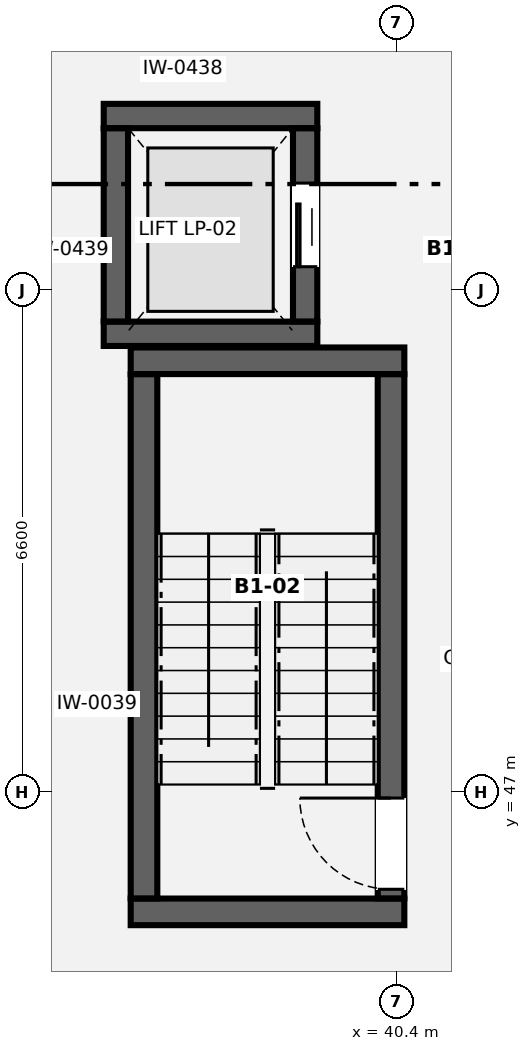
"""IFC4 building model, lengths in metres.
Left out: names, types, materials, properties, quantities, classifications, styles, units other than length and angle.
Written with IfcOpenShell. Run it as: python <this file> out.ifc"""

import sys

from ifc_helpers import new_model, si_unit, direction, frame, frame_2d, origin, place, context, subcontext, project, spatial, rectangle, extrude, element, fill, save


model = new_model("IFC4")
c1 = context("Model", 3, precision=1e-05, world=origin(), true_north=direction((0.0, 1.0)))
c2 = subcontext(c1, "Body", "Model", "MODEL_VIEW")
j1 = project(units=[si_unit("LENGTHUNIT", "METRE"), si_unit("PLANEANGLEUNIT", "RADIAN")], contexts=[c1])
p1 = place(None, origin())
s1 = spatial("IfcSite", under=j1, at=p1, CompositionType="ELEMENT")
p2 = place(p1, origin())
s2 = spatial("IfcBuilding", under=s1, at=p2, CompositionType="ELEMENT")
p3 = place(p2, frame((0.0, 0.0, -4.2)))
s3 = spatial("IfcBuildingStorey", under=s2, at=p3, CompositionType="ELEMENT", Elevation=-4.2)
for number, where, z_axis, x_axis in (
    (1, (36.9, 45.425, 0.0), (0.0, 0.0, 1.0), (1.0, 0.0, 0.0)),
    (2, (36.9, 52.675, 0.0), (0.0, 0.0, 1.0), (1.0, 0.0, 0.0)),
):
    element("IfcWall", number, at=place(p3, frame(where, z_axis=z_axis, x_axis=x_axis)), inside=s3, PredefinedType="SHEAR", context=c2, shape_type="SweptSolid", body=[
        extrude(rectangle(XDim=3.6, YDim=0.35, at=frame_2d((1.8, 0.0))), origin(), (0.0, 0.0, 1.0), 3.94),
    ])
p4 = place(p3, frame((37.075, 45.602, 0.0), z_axis=(0.0, 0.0, 1.0), x_axis=(0.0, 1.0, 0.0)))
e3 = element("IfcWall", 3, at=p4, inside=s3, PredefinedType="SHEAR", context=c2, shape_type="SweptSolid", body=[
    extrude(rectangle(XDim=6.896, YDim=0.35, at=frame_2d((3.448, 0.0))), origin(), (0.0, 0.0, 1.0), 3.94),
])
p5 = place(p3, frame((40.325, 45.602, 0.0), z_axis=(0.0, 0.0, 1.0), x_axis=(0.0, 1.0, 0.0)))
e4 = element("IfcWall", 4, at=p5, inside=s3, PredefinedType="SHEAR", context=c2, shape_type="SweptSolid", body=[
    extrude(rectangle(XDim=6.896, YDim=0.35, at=frame_2d((3.448, 0.0))), origin(), (0.0, 0.0, 1.0), 3.94),
])
p6 = place(p5, frame((0.12, 0.0, 0.0)))
e5 = element("IfcOpeningElement", 5, at=p6, cuts=e4, PredefinedType="OPENING", context=c2, shape_type="SweptSolid", body=[
    extrude(rectangle(XDim=1.2, YDim=2.15, at=frame_2d((0.6, 1.075))), frame((0.0, 0.185, 0.0), z_axis=(0.0, -1.0, 0.0), x_axis=(1.0, 0.0, 0.0)), (0.0, 0.0, 1.0), 0.37),
])
for number, where, z_axis, x_axis in (
    (6, (36.545, 53.03, 0.0), (0.0, 0.0, 1.0), (1.0, 0.0, 0.0)),
    (7, (36.545, 55.895, 0.0), (0.0, 0.0, 1.0), (1.0, 0.0, 0.0)),
):
    element("IfcWall", number, at=place(p3, frame(where, z_axis=z_axis, x_axis=x_axis)), inside=s3, PredefinedType="SHEAR", context=c2, shape_type="SweptSolid", body=[
        extrude(rectangle(XDim=2.81, YDim=0.32, at=frame_2d((1.405, 0.0))), origin(), (0.0, 0.0, 1.0), 3.94),
    ])
p7 = place(p3, frame((36.705, 53.192, 0.0), z_axis=(0.0, 0.0, 1.0), x_axis=(0.0, 1.0, 0.0)))
e8 = element("IfcWall", 8, at=p7, inside=s3, PredefinedType="SHEAR", context=c2, shape_type="SweptSolid", body=[
    extrude(rectangle(XDim=2.541, YDim=0.32, at=frame_2d((1.271, 0.0))), origin(), (0.0, 0.0, 1.0), 3.94),
])
p8 = place(p3, frame((39.195, 53.192, 0.0), z_axis=(0.0, 0.0, 1.0), x_axis=(0.0, 1.0, 0.0)))
e9 = element("IfcWall", 9, at=p8, inside=s3, PredefinedType="SHEAR", context=c2, shape_type="SweptSolid", body=[
    extrude(rectangle(XDim=2.541, YDim=0.32, at=frame_2d((1.271, 0.0))), origin(), (0.0, 0.0, 1.0), 3.94),
])
p9 = place(p8, frame((0.72, 0.0, 0.0)))
e10 = element("IfcOpeningElement", 10, at=p9, cuts=e9, PredefinedType="OPENING", context=c2, shape_type="SweptSolid", body=[
    extrude(rectangle(XDim=1.1, YDim=2.15, at=frame_2d((0.55, 1.075))), frame((0.0, 0.17, 0.0), z_axis=(0.0, -1.0, 0.0), x_axis=(1.0, 0.0, 0.0)), (0.0, 0.0, 1.0), 0.34),
])
p10 = place(p6, origin())
e11 = element("IfcDoor", 11, at=p10, inside=s3, OperationType="SINGLE_SWING_RIGHT", PredefinedType="DOOR", context=c2, shape_type="SweptSolid", body=[
    extrude(rectangle(XDim=1.2, YDim=2.15, at=frame_2d((0.6, 1.075))), frame((0.0, 0.025, 0.0), z_axis=(0.0, -1.0, 0.0), x_axis=(1.0, 0.0, 0.0)), (0.0, 0.0, 1.0), 0.05),
])
fill(e5, e11)
p11 = place(p9, origin())
e12 = element("IfcDoor", 12, at=p11, inside=s3, OperationType="SLIDING_TO_LEFT", PredefinedType="DOOR", context=c2, shape_type="SweptSolid", body=[
    extrude(rectangle(XDim=1.1, YDim=2.15, at=frame_2d((0.55, 1.075))), frame((0.0, 0.025, 0.0), z_axis=(0.0, -1.0, 0.0), x_axis=(1.0, 0.0, 0.0)), (0.0, 0.0, 1.0), 0.05),
])
fill(e10, e12)
save(model, sys.argv[1])
